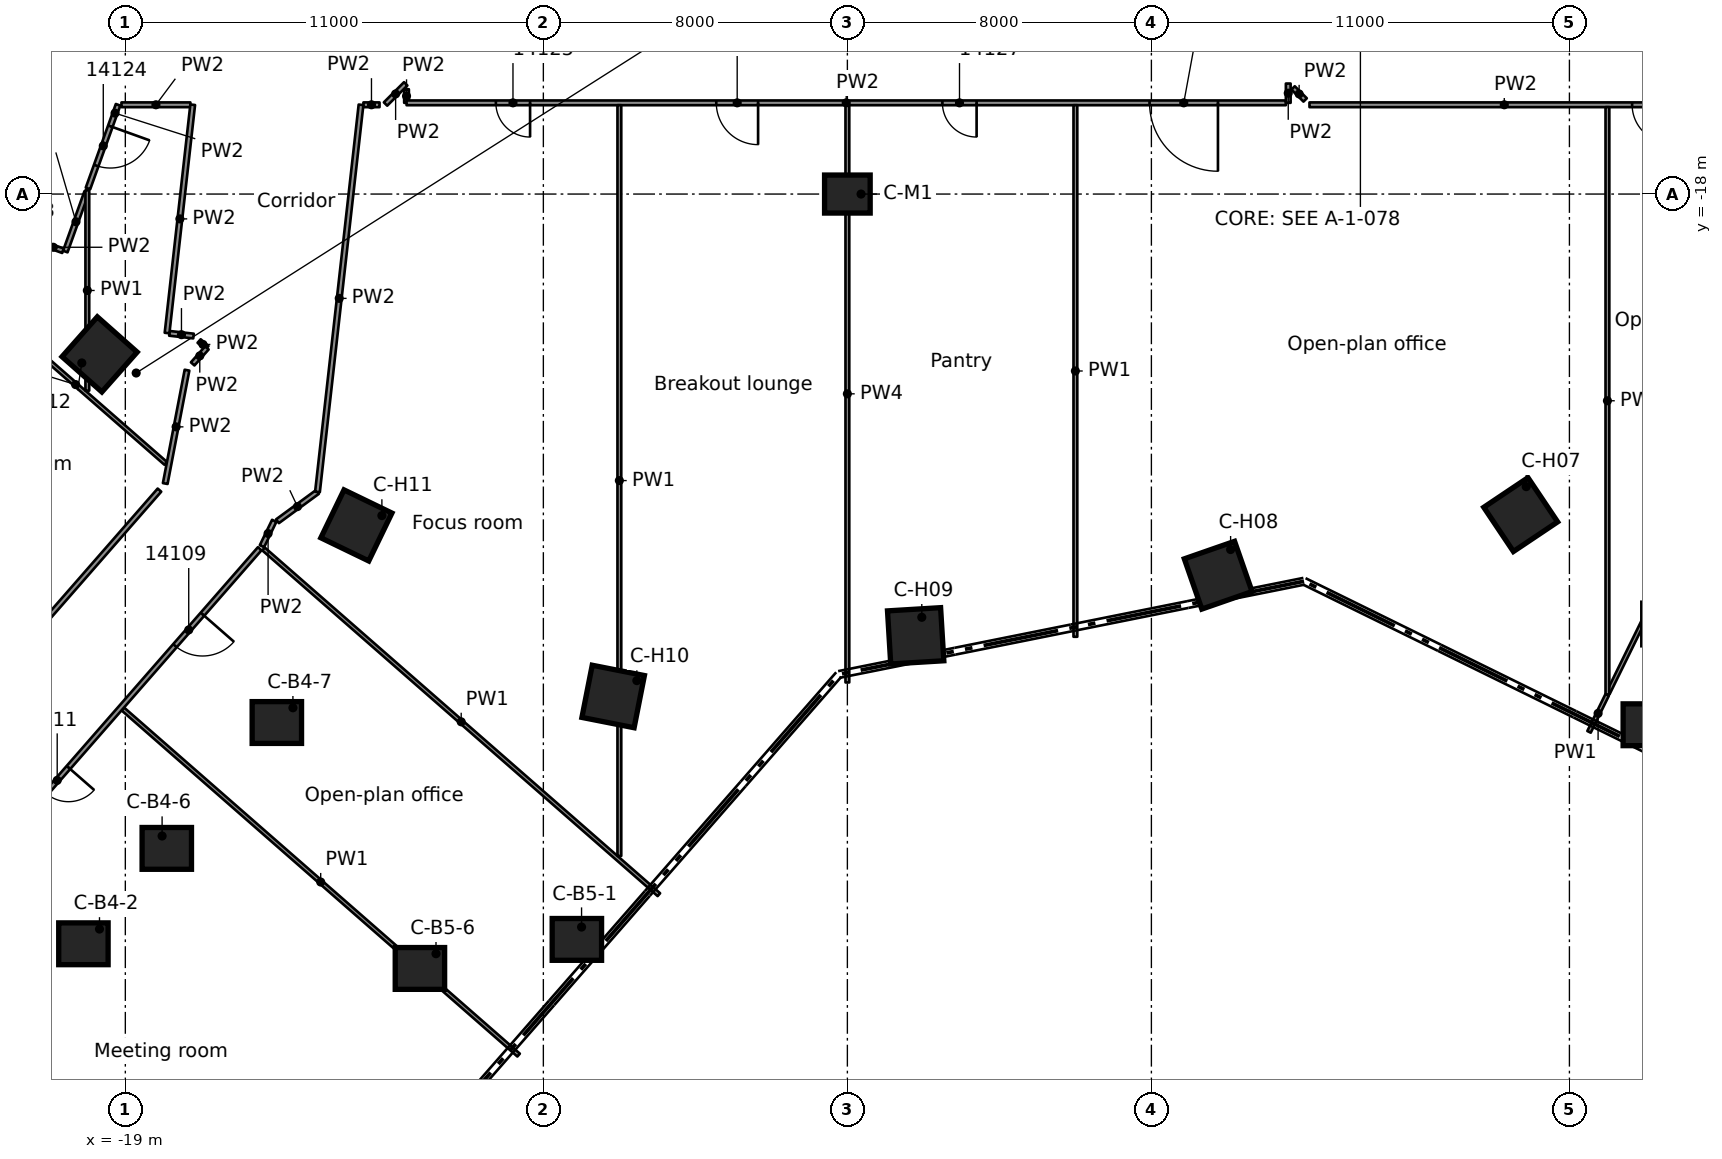
"""IFC4 building model, lengths in metres.
Left out: names, types, materials, properties, quantities, classifications, styles, units other than length and angle.
Written with IfcOpenShell. Run it as: python <this file> out.ifc"""

import sys

from ifc_helpers import new_model, si_unit, direction, frame, frame_2d, origin, origin_2d, place, context, subcontext, project, spatial, rectangle, extrude, element, fill, save


model = new_model("IFC4")
c1 = context("Model", 3, precision=1e-05, world=origin(), true_north=direction((0.0, 1.0)))
c2 = subcontext(c1, "Body", "Model", "MODEL_VIEW")
j1 = project(units=[si_unit("LENGTHUNIT", "METRE"), si_unit("PLANEANGLEUNIT", "RADIAN")], contexts=[c1])
p1 = place(None, origin())
s1 = spatial("IfcSite", under=j1, at=p1, CompositionType="ELEMENT")
p2 = place(p1, origin())
s2 = spatial("IfcBuilding", under=s1, at=p2, CompositionType="ELEMENT")
p3 = place(p2, frame((0.0, 0.0, 69.3)))
s3 = spatial("IfcBuildingStorey", under=s2, at=p3, CompositionType="ELEMENT", Elevation=69.3)
for number, where, z_axis, x_axis in (
    (1, (21.063, -31.964, 0.0), (0.0, 0.0, 1.0), (1.0, 0.0, 0.0)),
    (2, (-20.103, -37.727, 0.0), (0.0, 0.0, 1.0), (1.0, 0.0, 0.0)),
    (3, (-17.909, -35.217, 0.0), (0.0, 0.0, 1.0), (1.0, 0.0, 0.0)),
    (4, (-15.013, -31.905, 0.0), (0.0, 0.0, 1.0), (1.0, 0.0, 0.0)),
    (5, (-7.118, -37.612, 0.0), (0.0, 0.0, 1.0), (1.0, 0.0, 0.0)),
    (6, (-11.248, -38.376, 0.0), (0.0, 0.0, 1.0), (1.0, 0.0, 0.0)),
):
    element("IfcColumn", number, at=place(p3, frame(where, z_axis=z_axis, x_axis=x_axis)), inside=s3, PredefinedType="COLUMN", context=c2, shape_type="SweptSolid", body=[
        extrude(rectangle(XDim=1.3, YDim=1.1, at=origin_2d()), origin(), (0.0, 0.0, 1.0), 3.5),
    ])
for number, where, z_axis, x_axis in (
    (7, (17.718, -26.434, 0.0), (0.0, 0.0, 1.0), (0.557, -0.831, 0.0)),
    (8, (9.758, -28.029, 0.0), (0.0, 0.0, 1.0), (0.329, -0.944, 0.0)),
    (9, (1.797, -29.624, 0.0), (0.0, 0.0, 1.0), (0.061, -0.998, 0.0)),
    (10, (-6.163, -31.22, 0.0), (0.0, 0.0, 1.0), (-0.194, -0.981, 0.0)),
    (11, (-12.92, -26.719, 0.0), (0.0, 0.0, 1.0), (-0.435, -0.9, 0.0)),
    (12, (-19.677, -22.219, 0.0), (0.0, 0.0, 1.0), (-0.663, -0.749, 0.0)),
):
    element("IfcColumn", number, at=place(p3, frame(where, z_axis=z_axis, x_axis=x_axis)), inside=s3, PredefinedType="COLUMN", context=c2, shape_type="SweptSolid", body=[
        extrude(rectangle(XDim=1.4, YDim=1.4, at=origin_2d()), origin(), (0.0, 0.0, 1.0), 3.5),
    ])
p4 = place(p3, frame((0.0, -18.0, 0.0), z_axis=(0.0, 0.0, 1.0), x_axis=(1.0, 0.0, 0.0)))
e13 = element("IfcColumn", 13, at=p4, inside=s3, PredefinedType="COLUMN", context=c2, shape_type="SweptSolid", body=[
    extrude(rectangle(XDim=1.2, YDim=1.0, at=origin_2d()), origin(), (0.0, 0.0, 1.0), 3.5),
])
p5 = place(p3, frame((-11.601, -15.242, 0.0), z_axis=(0.0, 0.0, 1.0), x_axis=(0.002726642898, -0.999996282702, 0.0)))
e14 = element("IfcWall", 14, at=p5, inside=s3, PredefinedType="PARTITIONING", context=c2, shape_type="SweptSolid", body=[
    extrude(rectangle(XDim=0.358, YDim=0.125, at=frame_2d((0.179, 0.0))), origin(), (0.0, 0.0, 1.0), 3.03),
])
p6 = place(p3, frame((11.729, -15.207, 0.0), z_axis=(0.0, 0.0, 1.0), x_axis=(0.707106781187, -0.707106781187, 0.0)))
e15 = element("IfcWall", 15, at=p6, inside=s3, PredefinedType="PARTITIONING", context=c2, shape_type="SweptSolid", body=[
    extrude(rectangle(XDim=0.448, YDim=0.125, at=frame_2d((0.224, 0.0))), origin(), (0.0, 0.0, 1.0), 3.03),
])
p7 = place(p3, frame((-17.058, -21.867, 0.0), z_axis=(0.0, 0.0, 1.0), x_axis=(0.747902696109, -0.663808373819, 0.0)))
e16 = element("IfcWall", 16, at=p7, inside=s3, PredefinedType="PARTITIONING", context=c2, shape_type="SweptSolid", body=[
    extrude(rectangle(XDim=0.273, YDim=0.125, at=frame_2d((0.136, 0.0))), origin(), (0.0, 0.0, 1.0), 3.03),
])
p8 = place(p3, frame((-27.13, -40.771, 0.0), z_axis=(0.0, 0.0, 1.0), x_axis=(0.752792007078, -0.65825845538, 0.0)))
e17 = element("IfcWall", 17, at=p8, inside=s3, PredefinedType="PARTITIONING", context=c2, shape_type="SweptSolid", body=[
    extrude(rectangle(XDim=13.835, YDim=0.1, at=frame_2d((6.917, 0.0))), origin(), (0.0, 0.0, 1.0), 2.419),
])
p9 = place(p3, frame((-19.067, -31.548, 0.0), z_axis=(0.0, 0.0, 1.0), x_axis=(0.752795260656, -0.658254734531, 0.0)))
e18 = element("IfcWall", 18, at=p9, inside=s3, PredefinedType="PARTITIONING", context=c2, shape_type="SweptSolid", body=[
    extrude(rectangle(XDim=13.836, YDim=0.1, at=frame_2d((6.918, 0.0))), origin(), (0.0, 0.0, 1.0), 3.03),
])
p10 = place(p3, frame((-22.678, -20.942, 0.0), z_axis=(0.0, 0.0, 1.0), x_axis=(0.752857732361, -0.658183283611, 0.0)))
e19 = element("IfcWall", 19, at=p10, inside=s3, PredefinedType="PARTITIONING", context=c2, shape_type="SweptSolid", body=[
    extrude(rectangle(XDim=6.295, YDim=0.1, at=frame_2d((3.147, 0.0))), origin(), (0.0, 0.0, 1.0), 3.03),
])
p11 = place(p3, frame((-15.364, -27.338, 0.0), z_axis=(0.0, 0.0, 1.0), x_axis=(0.75280535981, -0.658243184729, 0.0)))
e20 = element("IfcWall", 20, at=p11, inside=s3, PredefinedType="PARTITIONING", context=c2, shape_type="SweptSolid", body=[
    extrude(rectangle(XDim=13.82, YDim=0.1, at=frame_2d((6.91, 0.0))), origin(), (0.0, 0.0, 1.0), 3.03),
])
p12 = place(p3, frame((-21.151, -19.308, 0.0), z_axis=(0.0, 0.0, 1.0), x_axis=(0.940956165673, -0.33852842463, 0.0)))
e21 = element("IfcWall", 21, at=p12, inside=s3, PredefinedType="PARTITIONING", context=c2, shape_type="SweptSolid", body=[
    extrude(rectangle(XDim=0.543, YDim=0.125, at=frame_2d((0.271, 0.0))), origin(), (0.0, 0.0, 1.0), 3.03),
])
p13 = place(p3, frame((-14.996, -26.609, 0.0), z_axis=(0.0, 0.0, 1.0), x_axis=(0.806577539033, 0.591128305469, 0.0)))
e22 = element("IfcWall", 22, at=p13, inside=s3, PredefinedType="PARTITIONING", context=c2, shape_type="SweptSolid", body=[
    extrude(rectangle(XDim=1.304, YDim=0.125, at=frame_2d((0.652, 0.0))), origin(), (0.0, 0.0, 1.0), 3.03),
])
p14 = place(p3, frame((-17.84, -21.665, 0.0), z_axis=(0.0, 0.0, 1.0), x_axis=(0.993780638981, -0.111355473987, 0.0)))
e23 = element("IfcWall", 23, at=p14, inside=s3, PredefinedType="PARTITIONING", context=c2, shape_type="SweptSolid", body=[
    extrude(rectangle(XDim=0.638, YDim=0.125, at=frame_2d((0.319, 0.0))), origin(), (0.0, 0.0, 1.0), 3.03),
])
p15 = place(p3, frame((-19.102, -15.651, 0.0), z_axis=(0.0, 0.0, 1.0), x_axis=(1.0, 0.0, 0.0)))
e24 = element("IfcWall", 24, at=p15, inside=s3, PredefinedType="PARTITIONING", context=c2, shape_type="SweptSolid", body=[
    extrude(rectangle(XDim=1.814, YDim=0.125, at=frame_2d((0.907, 0.0))), origin(), (0.0, 0.0, 1.0), 3.03),
])
p16 = place(p3, frame((-12.735, -15.651, 0.0), z_axis=(0.0, 0.0, 1.0), x_axis=(1.0, 0.0, 0.0)))
e25 = element("IfcWall", 25, at=p16, inside=s3, PredefinedType="PARTITIONING", context=c2, shape_type="SweptSolid", body=[
    extrude(rectangle(XDim=0.424, YDim=0.125, at=frame_2d((0.212, 0.0))), origin(), (0.0, 0.0, 1.0), 3.03),
])
p17 = place(p3, frame((22.412, -15.651, 0.0), z_axis=(0.0, 0.0, 1.0), x_axis=(-1.0, 0.0, 0.0)))
e26 = element("IfcWall", 26, at=p17, inside=s3, PredefinedType="PARTITIONING", context=c2, shape_type="SweptSolid", body=[
    extrude(rectangle(XDim=10.252, YDim=0.125, at=frame_2d((5.126, 0.0))), origin(), (0.0, 0.0, 1.0), 3.03),
])
p18 = place(p17, frame((0.762, 0.0, 0.0)))
e27 = element("IfcOpeningElement", 27, at=p18, cuts=e26, PredefinedType="OPENING", context=c2, shape_type="SweptSolid", body=[
    extrude(rectangle(XDim=1.0, YDim=2.1, at=frame_2d((0.5, 1.05))), frame((0.0, 0.073, 0.0), z_axis=(0.0, -1.0, 0.0), x_axis=(1.0, 0.0, 0.0)), (0.0, 0.0, 1.0), 0.145),
])
p19 = place(p3, frame((11.539, -15.6, 0.0), z_axis=(0.0, 0.0, 1.0), x_axis=(-1.0, 0.0, 0.0)))
e28 = element("IfcWall", 28, at=p19, inside=s3, PredefinedType="PARTITIONING", context=c2, shape_type="SweptSolid", body=[
    extrude(rectangle(XDim=23.139, YDim=0.125, at=frame_2d((11.57, 0.0))), origin(), (0.0, 0.0, 1.0), 3.03),
])
p20 = place(p19, frame((19.888, 0.0, 0.0)))
e29 = element("IfcOpeningElement", 29, at=p20, cuts=e28, PredefinedType="OPENING", context=c2, shape_type="SweptSolid", body=[
    extrude(rectangle(XDim=0.9, YDim=2.1, at=frame_2d((0.45, 1.05))), frame((0.0, 0.073, 0.0), z_axis=(0.0, -1.0, 0.0), x_axis=(1.0, 0.0, 0.0)), (0.0, 0.0, 1.0), 0.145),
])
p21 = place(p19, frame((13.888, 0.0, 0.0)))
e30 = element("IfcOpeningElement", 30, at=p21, cuts=e28, PredefinedType="OPENING", context=c2, shape_type="SweptSolid", body=[
    extrude(rectangle(XDim=1.1, YDim=2.1, at=frame_2d((0.55, 1.05))), frame((0.0, 0.073, 0.0), z_axis=(0.0, -1.0, 0.0), x_axis=(1.0, 0.0, 0.0)), (0.0, 0.0, 1.0), 0.145),
])
p22 = place(p19, frame((8.138, 0.0, 0.0)))
e31 = element("IfcOpeningElement", 31, at=p22, cuts=e28, PredefinedType="OPENING", context=c2, shape_type="SweptSolid", body=[
    extrude(rectangle(XDim=0.9, YDim=2.1, at=frame_2d((0.45, 1.05))), frame((0.0, 0.073, 0.0), z_axis=(0.0, -1.0, 0.0), x_axis=(1.0, 0.0, 0.0)), (0.0, 0.0, 1.0), 0.145),
])
p23 = place(p19, frame((1.788, 0.0, 0.0)))
e32 = element("IfcOpeningElement", 32, at=p23, cuts=e28, PredefinedType="OPENING", context=c2, shape_type="SweptSolid", body=[
    extrude(rectangle(XDim=1.8, YDim=2.1, at=frame_2d((0.9, 1.05))), frame((0.0, 0.073, 0.0), z_axis=(0.0, -1.0, 0.0), x_axis=(1.0, 0.0, 0.0)), (0.0, 0.0, 1.0), 0.145),
])
p24 = place(p3, frame((-12.153, -15.631, 0.0), z_axis=(0.0, 0.0, 1.0), x_axis=(0.707106781187, 0.707106781187, 0.0)))
e33 = element("IfcWall", 33, at=p24, inside=s3, PredefinedType="PARTITIONING", context=c2, shape_type="SweptSolid", body=[
    extrude(rectangle(XDim=0.751, YDim=0.125, at=frame_2d((0.375, 0.0))), origin(), (0.0, 0.0, 1.0), 3.03),
])
p25 = place(p3, frame((-17.228, -22.469, 0.0), z_axis=(0.0, 0.0, 1.0), x_axis=(0.664256182607, 0.747504999226, 0.0)))
e34 = element("IfcWall", 34, at=p25, inside=s3, PredefinedType="PARTITIONING", context=c2, shape_type="SweptSolid", body=[
    extrude(rectangle(XDim=0.563, YDim=0.125, at=frame_2d((0.281, 0.0))), origin(), (0.0, 0.0, 1.0), 3.03),
])
p26 = place(p3, frame((-15.464, -27.333, 0.0), z_axis=(0.0, 0.0, 1.0), x_axis=(-0.658239133646, -0.752808902004, 0.0)))
e35 = element("IfcWall", 35, at=p26, inside=s3, PredefinedType="PARTITIONING", context=c2, shape_type="SweptSolid", body=[
    extrude(rectangle(XDim=24.745, YDim=0.125, at=frame_2d((12.372, 0.0))), origin(), (0.0, 0.0, 1.0), 3.03),
])
p27 = place(p26, frame((2.288, 0.0, 0.0)))
e36 = element("IfcOpeningElement", 36, at=p27, cuts=e35, PredefinedType="OPENING", context=c2, shape_type="SweptSolid", body=[
    extrude(rectangle(XDim=1.1, YDim=2.1, at=frame_2d((0.55, 1.05))), frame((0.0, 0.073, 0.0), z_axis=(0.0, -1.0, 0.0), x_axis=(1.0, 0.0, 0.0)), (0.0, 0.0, 1.0), 0.145),
])
p28 = place(p26, frame((13.944, 0.0, 0.0)))
e37 = element("IfcOpeningElement", 37, at=p28, cuts=e35, PredefinedType="OPENING", context=c2, shape_type="SweptSolid", body=[
    extrude(rectangle(XDim=0.9, YDim=2.1, at=frame_2d((0.45, 1.05))), frame((0.0, 0.073, 0.0), z_axis=(0.0, -1.0, 0.0), x_axis=(1.0, 0.0, 0.0)), (0.0, 0.0, 1.0), 0.145),
])
p29 = place(p26, frame((7.646, 0.0, 0.0)))
e38 = element("IfcOpeningElement", 38, at=p29, cuts=e35, PredefinedType="OPENING", context=c2, shape_type="SweptSolid", body=[
    extrude(rectangle(XDim=0.9, YDim=2.1, at=frame_2d((0.45, 1.05))), frame((0.0, 0.073, 0.0), z_axis=(0.0, -1.0, 0.0), x_axis=(1.0, 0.0, 0.0)), (0.0, 0.0, 1.0), 0.145),
])
p30 = place(p26, frame((20.895, 0.0, 0.0)))
e39 = element("IfcOpeningElement", 39, at=p30, cuts=e35, PredefinedType="OPENING", context=c2, shape_type="SweptSolid", body=[
    extrude(rectangle(XDim=0.9, YDim=2.1, at=frame_2d((0.45, 1.05))), frame((0.0, 0.073, 0.0), z_axis=(0.0, -1.0, 0.0), x_axis=(1.0, 0.0, 0.0)), (0.0, 0.0, 1.0), 0.145),
])
p31 = place(p3, frame((-32.036, -41.726, 0.0), z_axis=(0.0, 0.0, 1.0), x_axis=(0.658231851406, 0.752815269369, 0.0)))
e40 = element("IfcWall", 40, at=p31, inside=s3, PredefinedType="PARTITIONING", context=c2, shape_type="SweptSolid", body=[
    extrude(rectangle(XDim=21.169, YDim=0.125, at=frame_2d((10.584, 0.0))), origin(), (0.0, 0.0, 1.0), 3.03),
])
p32 = place(p3, frame((20.015, -31.133, 0.0), z_axis=(0.0, 0.0, 1.0), x_axis=(0.440975509771, 0.897519136165, 0.0)))
e41 = element("IfcWall", 41, at=p32, inside=s3, PredefinedType="PARTITIONING", context=c2, shape_type="SweptSolid", body=[
    extrude(rectangle(XDim=12.765, YDim=0.1, at=frame_2d((6.383, 0.0))), origin(), (0.0, 0.0, 1.0), 3.03),
])
p33 = place(p3, frame((19.516, -32.151, 0.0), z_axis=(0.0, 0.0, 1.0), x_axis=(0.44043528265, 0.897784362638, 0.0)))
e42 = element("IfcWall", 42, at=p33, inside=s3, PredefinedType="PARTITIONING", context=c2, shape_type="SweptSolid", body=[
    extrude(rectangle(XDim=1.083, YDim=0.1, at=frame_2d((0.541, 0.0))), origin(), (0.0, 0.0, 1.0), 3.03),
])
p34 = place(p3, frame((-15.405, -27.266, 0.0), z_axis=(0.0, 0.0, 1.0), x_axis=(0.435199770088, 0.900333915897, 0.0)))
e43 = element("IfcWall", 43, at=p34, inside=s3, PredefinedType="PARTITIONING", context=c2, shape_type="SweptSolid", body=[
    extrude(rectangle(XDim=0.742, YDim=0.125, at=frame_2d((0.371, 0.0))), origin(), (0.0, 0.0, 1.0), 3.03),
])
p35 = place(p3, frame((-19.191, -15.651, 0.0), z_axis=(0.0, 0.0, 1.0), x_axis=(-0.338423918893, -0.940993757217, 0.0)))
e44 = element("IfcWall", 44, at=p35, inside=s3, PredefinedType="PARTITIONING", context=c2, shape_type="SweptSolid", body=[
    extrude(rectangle(XDim=2.34, YDim=0.125, at=frame_2d((1.17, 0.0))), origin(), (0.0, 0.0, 1.0), 3.03),
])
p36 = place(p35, frame((0.6, 0.0, 0.0)))
e45 = element("IfcOpeningElement", 45, at=p36, cuts=e44, PredefinedType="OPENING", context=c2, shape_type="SweptSolid", body=[
    extrude(rectangle(XDim=1.1, YDim=2.1, at=frame_2d((0.55, 1.05))), frame((0.0, 0.073, 0.0), z_axis=(0.0, -1.0, 0.0), x_axis=(1.0, 0.0, 0.0)), (0.0, 0.0, 1.0), 0.145),
])
p37 = place(p3, frame((-20.58, -19.513, 0.0), z_axis=(0.0, 0.0, 1.0), x_axis=(0.338137852557, 0.941096590509, 0.0)))
e46 = element("IfcWall", 46, at=p37, inside=s3, PredefinedType="PARTITIONING", context=c2, shape_type="SweptSolid", body=[
    extrude(rectangle(XDim=1.665, YDim=0.125, at=frame_2d((0.833, 0.0))), origin(), (0.0, 0.0, 1.0), 3.03),
])
p38 = place(p3, frame((-17.95, -25.617, 0.0), z_axis=(0.0, 0.0, 1.0), x_axis=(0.188644670049, 0.982045410591, 0.0)))
e47 = element("IfcWall", 47, at=p38, inside=s3, PredefinedType="PARTITIONING", context=c2, shape_type="SweptSolid", body=[
    extrude(rectangle(XDim=3.037, YDim=0.125, at=frame_2d((1.519, 0.0))), origin(), (0.0, 0.0, 1.0), 3.03),
])
p39 = place(p3, frame((-13.944, -25.838, 0.0), z_axis=(0.0, 0.0, 1.0), x_axis=(0.111803887366, 0.993730290758, 0.0)))
e48 = element("IfcWall", 48, at=p39, inside=s3, PredefinedType="PARTITIONING", context=c2, shape_type="SweptSolid", body=[
    extrude(rectangle(XDim=10.25, YDim=0.125, at=frame_2d((5.125, 0.0))), origin(), (0.0, 0.0, 1.0), 3.03),
])
p40 = place(p3, frame((-17.902, -21.657, 0.0), z_axis=(0.0, 0.0, 1.0), x_axis=(0.111672630046, 0.993745049647, 0.0)))
e49 = element("IfcWall", 49, at=p40, inside=s3, PredefinedType="PARTITIONING", context=c2, shape_type="SweptSolid", body=[
    extrude(rectangle(XDim=6.045, YDim=0.125, at=frame_2d((3.022, 0.0))), origin(), (0.0, 0.0, 1.0), 3.03),
])
p41 = place(p3, frame((20.0, -31.165, 0.0), z_axis=(0.0, 0.0, 1.0), x_axis=(0.0, 1.0, 0.0)))
e50 = element("IfcWall", 50, at=p41, inside=s3, PredefinedType="PARTITIONING", context=c2, shape_type="SweptSolid", body=[
    extrude(rectangle(XDim=15.452, YDim=0.1, at=frame_2d((7.726, 0.0))), origin(), (0.0, 0.0, 1.0), 3.03),
])
p42 = place(p3, frame((11.601, -15.6, 0.0), z_axis=(0.0, 0.0, 1.0), x_axis=(0.0, 1.0, 0.0)))
e51 = element("IfcWall", 51, at=p42, inside=s3, PredefinedType="PARTITIONING", context=c2, shape_type="SweptSolid", body=[
    extrude(rectangle(XDim=0.508, YDim=0.125, at=frame_2d((0.254, 0.0))), origin(), (0.0, 0.0, 1.0), 3.03),
])
p43 = place(p3, frame((6.0, -29.649, 0.0), z_axis=(0.0, 0.0, 1.0), x_axis=(0.0, 1.0, 0.0)))
e52 = element("IfcWall", 52, at=p43, inside=s3, PredefinedType="PARTITIONING", context=c2, shape_type="SweptSolid", body=[
    extrude(rectangle(XDim=13.987, YDim=0.1, at=frame_2d((6.993, 0.0))), origin(), (0.0, 0.0, 1.0), 3.03),
])
p44 = place(p3, frame((0.0, -30.851, 0.0), z_axis=(0.0, 0.0, 1.0), x_axis=(0.0, 1.0, 0.0)))
e53 = element("IfcWall", 53, at=p44, inside=s3, PredefinedType="PARTITIONING", context=c2, shape_type="SweptSolid", body=[
    extrude(rectangle(XDim=15.189, YDim=0.1, at=frame_2d((7.594, 0.0))), origin(), (0.0, 0.0, 1.0), 2.419),
])
p45 = place(p3, frame((-6.0, -35.416, 0.0), z_axis=(0.0, 0.0, 1.0), x_axis=(0.0, 1.0, 0.0)))
e54 = element("IfcWall", 54, at=p45, inside=s3, PredefinedType="PARTITIONING", context=c2, shape_type="SweptSolid", body=[
    extrude(rectangle(XDim=19.754, YDim=0.1, at=frame_2d((9.877, 0.0))), origin(), (0.0, 0.0, 1.0), 3.03),
])
p46 = place(p3, frame((-20.0, -23.174, 0.0), z_axis=(0.0, 0.0, 1.0), x_axis=(0.0, 1.0, 0.0)))
e55 = element("IfcWall", 55, at=p46, inside=s3, PredefinedType="PARTITIONING", context=c2, shape_type="SweptSolid", body=[
    extrude(rectangle(XDim=5.274, YDim=0.1, at=frame_2d((2.637, 0.0))), origin(), (0.0, 0.0, 1.0), 3.03),
])
p47 = place(p27, origin())
e56 = element("IfcDoor", 56, at=p47, inside=s3, OperationType="SINGLE_SWING_LEFT", PredefinedType="DOOR", context=c2, shape_type="SweptSolid", body=[
    extrude(rectangle(XDim=1.1, YDim=2.1, at=frame_2d((0.55, 1.05))), frame((0.0, 0.025, 0.0), z_axis=(0.0, -1.0, 0.0), x_axis=(1.0, 0.0, 0.0)), (0.0, 0.0, 1.0), 0.05),
])
fill(e36, e56)
p48 = place(p29, origin())
e57 = element("IfcDoor", 57, at=p48, inside=s3, OperationType="SINGLE_SWING_LEFT", PredefinedType="DOOR", context=c2, shape_type="SweptSolid", body=[
    extrude(rectangle(XDim=0.9, YDim=2.1, at=frame_2d((0.45, 1.05))), frame((0.0, 0.025, 0.0), z_axis=(0.0, -1.0, 0.0), x_axis=(1.0, 0.0, 0.0)), (0.0, 0.0, 1.0), 0.05),
])
fill(e38, e57)
p49 = place(p36, origin())
e58 = element("IfcDoor", 58, at=p49, inside=s3, OperationType="SINGLE_SWING_LEFT", PredefinedType="DOOR", context=c2, shape_type="SweptSolid", body=[
    extrude(rectangle(XDim=1.1, YDim=2.1, at=frame_2d((0.55, 1.05))), frame((0.0, 0.025, 0.0), z_axis=(0.0, -1.0, 0.0), x_axis=(1.0, 0.0, 0.0)), (0.0, 0.0, 1.0), 0.05),
])
fill(e45, e58)
p50 = place(p20, origin())
e59 = element("IfcDoor", 59, at=p50, inside=s3, OperationType="SINGLE_SWING_RIGHT", PredefinedType="DOOR", context=c2, shape_type="SweptSolid", body=[
    extrude(rectangle(XDim=0.9, YDim=2.1, at=frame_2d((0.45, 1.05))), frame((0.0, 0.025, 0.0), z_axis=(0.0, -1.0, 0.0), x_axis=(1.0, 0.0, 0.0)), (0.0, 0.0, 1.0), 0.05),
])
fill(e29, e59)
p51 = place(p21, origin())
e60 = element("IfcDoor", 60, at=p51, inside=s3, OperationType="SINGLE_SWING_RIGHT", PredefinedType="DOOR", context=c2, shape_type="SweptSolid", body=[
    extrude(rectangle(XDim=1.1, YDim=2.1, at=frame_2d((0.55, 1.05))), frame((0.0, 0.025, 0.0), z_axis=(0.0, -1.0, 0.0), x_axis=(1.0, 0.0, 0.0)), (0.0, 0.0, 1.0), 0.05),
])
fill(e30, e60)
p52 = place(p22, origin())
e61 = element("IfcDoor", 61, at=p52, inside=s3, OperationType="SINGLE_SWING_LEFT", PredefinedType="DOOR", context=c2, shape_type="SweptSolid", body=[
    extrude(rectangle(XDim=0.9, YDim=2.1, at=frame_2d((0.45, 1.05))), frame((0.0, 0.025, 0.0), z_axis=(0.0, -1.0, 0.0), x_axis=(1.0, 0.0, 0.0)), (0.0, 0.0, 1.0), 0.05),
])
fill(e31, e61)
p53 = place(p23, origin())
e62 = element("IfcDoor", 62, at=p53, inside=s3, OperationType="DOUBLE_DOOR_SINGLE_SWING", PredefinedType="DOOR", context=c2, shape_type="SweptSolid", body=[
    extrude(rectangle(XDim=1.8, YDim=2.1, at=frame_2d((0.9, 1.05))), frame((0.0, 0.025, 0.0), z_axis=(0.0, -1.0, 0.0), x_axis=(1.0, 0.0, 0.0)), (0.0, 0.0, 1.0), 0.05),
])
fill(e32, e62)
p54 = place(p18, origin())
e63 = element("IfcDoor", 63, at=p54, inside=s3, OperationType="SINGLE_SWING_LEFT", PredefinedType="DOOR", context=c2, shape_type="SweptSolid", body=[
    extrude(rectangle(XDim=1.0, YDim=2.1, at=frame_2d((0.5, 1.05))), frame((0.0, 0.025, 0.0), z_axis=(0.0, -1.0, 0.0), x_axis=(1.0, 0.0, 0.0)), (0.0, 0.0, 1.0), 0.05),
])
fill(e27, e63)
save(model, sys.argv[1])
